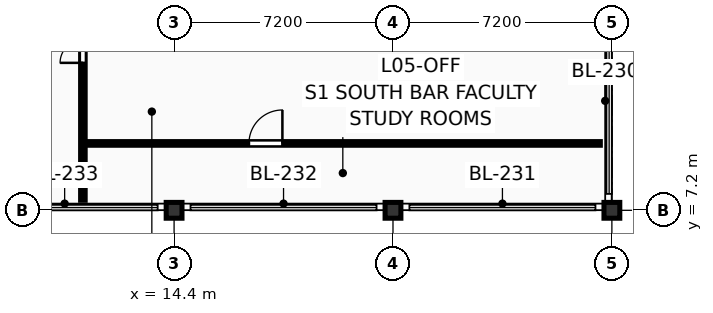
"""IFC4 building model, lengths in metres.
Left out: names, types, materials, properties, quantities, classifications, styles, units other than length and angle.
Written with IfcOpenShell. Run it as: python <this file> out.ifc"""

import sys

from ifc_helpers import new_model, si_unit, direction, frame, frame_2d, origin, origin_2d, place, context, subcontext, project, spatial, rectangle, extrude, element, fill, save


model = new_model("IFC4")
c1 = context("Model", 3, precision=1e-05, world=origin(), true_north=direction((0.0, 1.0)))
c2 = subcontext(c1, "Body", "Model", "MODEL_VIEW")
j1 = project(units=[si_unit("LENGTHUNIT", "METRE"), si_unit("PLANEANGLEUNIT", "RADIAN")], contexts=[c1])
p1 = place(None, origin())
s1 = spatial("IfcSite", under=j1, at=p1, CompositionType="ELEMENT")
p2 = place(p1, origin())
s2 = spatial("IfcBuilding", under=s1, at=p2, CompositionType="ELEMENT")
p3 = place(p2, frame((0.0, 0.0, 19.35)))
s3 = spatial("IfcBuildingStorey", under=s2, at=p3, CompositionType="ELEMENT", Elevation=19.35)
for number, where, z_axis, x_axis in (
    (1, (14.4, 7.2, 0.0), (0.0, 0.0, 1.0), (1.0, 0.0, 0.0)),
    (2, (21.6, 7.2, 0.0), (0.0, 0.0, 1.0), (1.0, 0.0, 0.0)),
    (3, (28.8, 7.2, 0.0), (0.0, 0.0, 1.0), (1.0, 0.0, 0.0)),
):
    element("IfcColumn", number, at=place(p3, frame(where, z_axis=z_axis, x_axis=x_axis)), inside=s3, PredefinedType="COLUMN", context=c2, shape_type="SweptSolid", body=[
        extrude(rectangle(XDim=0.52, YDim=0.52, at=origin_2d()), origin(), (0.0, 0.0, 1.0), 3.6),
    ])
p4 = place(p3, frame((11.4, 7.53, 0.0), z_axis=(0.0, 0.0, 1.0), x_axis=(0.0, 1.0, 0.0)))
e4 = element("IfcWall", 4, at=p4, inside=s3, PredefinedType="PARTITIONING", context=c2, shape_type="SweptSolid", body=[
    extrude(rectangle(XDim=6.59, YDim=0.15, at=frame_2d((3.295, 0.0))), origin(), (0.0, 0.0, 1.0), 3.375),
])
p5 = place(p4, frame((4.52, 0.0, 0.0)))
e5 = element("IfcOpeningElement", 5, at=p5, cuts=e4, PredefinedType="OPENING", context=c2, shape_type="SweptSolid", body=[
    extrude(rectangle(XDim=1.5, YDim=2.2, at=frame_2d((0.75, 1.1))), frame((0.0, 0.087, 0.0), z_axis=(0.0, -1.0, 0.0), x_axis=(1.0, 0.0, 0.0)), (0.0, 0.0, 1.0), 0.174),
])
p6 = place(p3, frame((11.515, 9.4, 0.0), z_axis=(0.0, 0.0, 1.0), x_axis=(1.0, 0.0, 0.0)))
e6 = element("IfcWall", 6, at=p6, inside=s3, PredefinedType="PARTITIONING", context=c2, shape_type="SweptSolid", body=[
    extrude(rectangle(XDim=16.905, YDim=0.12, at=frame_2d((8.453, 0.0))), origin(), (0.0, 0.0, 1.0), 3.375),
])
p7 = place(p6, frame((5.347, 0.0, 0.0)))
e7 = element("IfcOpeningElement", 7, at=p7, cuts=e6, PredefinedType="OPENING", context=c2, shape_type="SweptSolid", body=[
    extrude(rectangle(XDim=1.1, YDim=2.15, at=frame_2d((0.55, 1.075))), frame((0.0, 0.072, 0.0), z_axis=(0.0, -1.0, 0.0), x_axis=(1.0, 0.0, 0.0)), (0.0, 0.0, 1.0), 0.144),
])
p8 = place(p5, origin())
e8 = element("IfcDoor", 8, at=p8, inside=s3, OperationType="DOUBLE_DOOR_SINGLE_SWING", PredefinedType="DOOR", context=c2, shape_type="SweptSolid", body=[
    extrude(rectangle(XDim=1.5, YDim=2.2, at=frame_2d((0.75, 1.1))), frame((0.0, 0.025, 0.0), z_axis=(0.0, -1.0, 0.0), x_axis=(1.0, 0.0, 0.0)), (0.0, 0.0, 1.0), 0.05),
])
fill(e5, e8)
p9 = place(p7, origin())
e9 = element("IfcDoor", 9, at=p9, inside=s3, OperationType="SINGLE_SWING_RIGHT", PredefinedType="DOOR", context=c2, shape_type="SweptSolid", body=[
    extrude(rectangle(XDim=1.1, YDim=2.15, at=frame_2d((0.55, 1.075))), frame((0.0, 0.025, 0.0), z_axis=(0.0, -1.0, 0.0), x_axis=(1.0, 0.0, 0.0)), (0.0, 0.0, 1.0), 0.05),
])
fill(e7, e9)
save(model, sys.argv[1])
